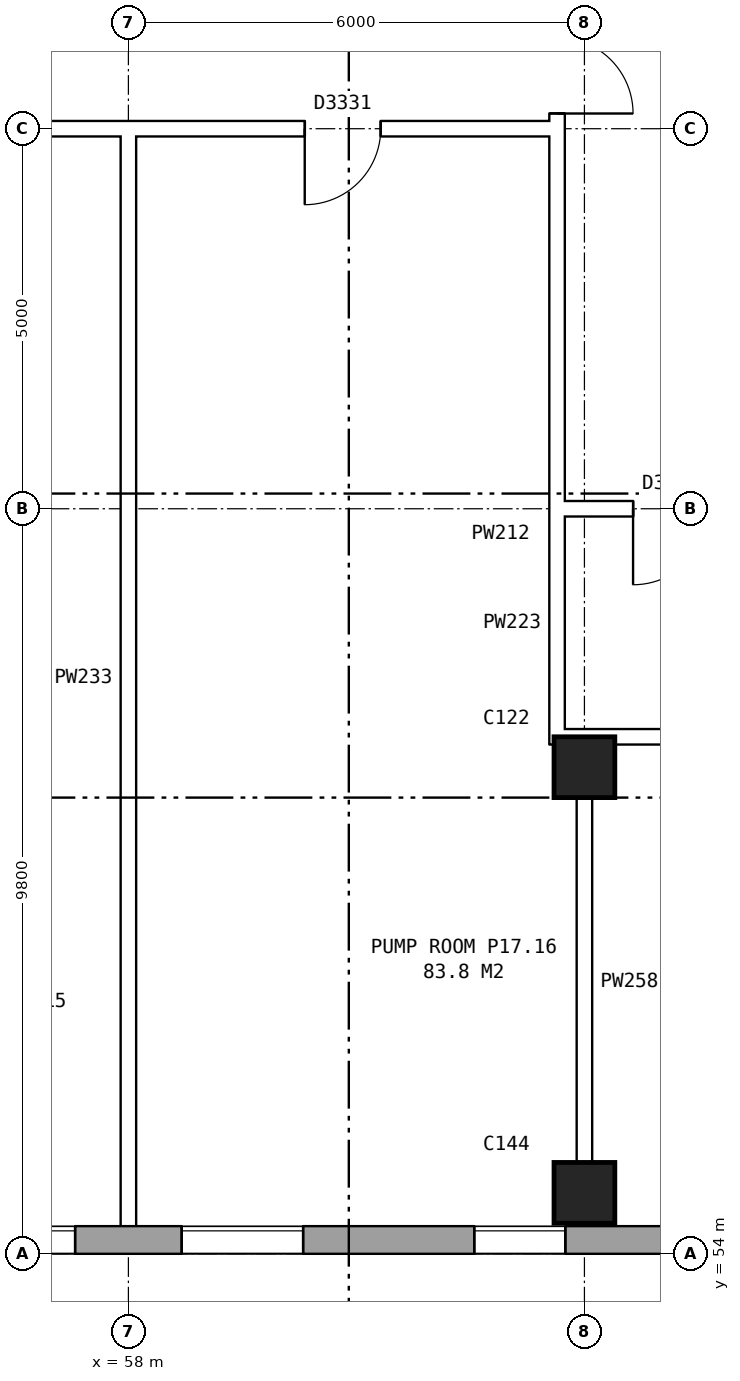
"""IFC4 building model, lengths in metres.
Left out: names, types, materials, properties, quantities, classifications, styles, units other than length and angle.
Written with IfcOpenShell. Run it as: python <this file> out.ifc"""

import sys

from ifc_helpers import new_model, si_unit, direction, frame, frame_2d, origin, origin_2d, place, context, subcontext, project, spatial, rectangle, extrude, element, fill, save


model = new_model("IFC4")
c1 = context("Model", 3, precision=1e-05, world=origin(), true_north=direction((0.0, 1.0)))
c2 = subcontext(c1, "Body", "Model", "MODEL_VIEW")
j1 = project(units=[si_unit("LENGTHUNIT", "METRE"), si_unit("PLANEANGLEUNIT", "RADIAN")], contexts=[c1])
p1 = place(None, origin())
s1 = spatial("IfcSite", under=j1, at=p1, CompositionType="ELEMENT")
p2 = place(p1, origin())
s2 = spatial("IfcBuilding", under=s1, at=p2, CompositionType="ELEMENT")
p3 = place(p2, frame((0.0, 0.0, 62.9)))
s3 = spatial("IfcBuildingStorey", under=s2, at=p3, CompositionType="ELEMENT", Elevation=62.9)
for number, where, z_axis, x_axis in (
    (1, (64.0, 54.8, 0.0), (0.0, 0.0, 1.0), (1.0, 0.0, 0.0)),
    (2, (64.0, 60.4, 0.0), (0.0, 0.0, 1.0), (1.0, 0.0, 0.0)),
):
    element("IfcColumn", number, at=place(p3, frame(where, z_axis=z_axis, x_axis=x_axis)), inside=s3, PredefinedType="COLUMN", context=c2, shape_type="SweptSolid", body=[
        extrude(rectangle(XDim=0.8, YDim=0.8, at=origin_2d()), origin(), (0.0, 0.0, 1.0), 4.2),
    ])
p4 = place(p3, frame((26.325, 54.18, 0.0), z_axis=(0.0, 0.0, 1.0), x_axis=(1.0, 0.0, 0.0)))
e3 = element("IfcWall", 3, at=p4, inside=s3, PredefinedType="STANDARD", context=c2, shape_type="SweptSolid", body=[
    extrude(rectangle(XDim=46.601, YDim=0.36, at=frame_2d((23.3, 0.0))), origin(), (0.0, 0.0, 1.0), 4.2),
])
p5 = place(p4, frame((0.6, 0.0, 1.5)))
e4 = element("IfcOpeningElement", 4, at=p5, cuts=e3, PredefinedType="OPENING", context=c2, shape_type="SweptSolid", body=[
    extrude(rectangle(XDim=0.6, YDim=1.2, at=frame_2d((0.3, 0.6))), frame((0.0, 0.19, 0.0), z_axis=(0.0, -1.0, 0.0), x_axis=(1.0, 0.0, 0.0)), (0.0, 0.0, 1.0), 0.38),
])
p6 = place(p4, frame((5.375, 0.0, 1.5)))
e5 = element("IfcOpeningElement", 5, at=p6, cuts=e3, PredefinedType="OPENING", context=c2, shape_type="SweptSolid", body=[
    extrude(rectangle(XDim=1.6, YDim=1.2, at=frame_2d((0.8, 0.6))), frame((0.0, 0.19, 0.0), z_axis=(0.0, -1.0, 0.0), x_axis=(1.0, 0.0, 0.0)), (0.0, 0.0, 1.0), 0.38),
])
p7 = place(p4, frame((8.375, 0.0, 1.5)))
e6 = element("IfcOpeningElement", 6, at=p7, cuts=e3, PredefinedType="OPENING", context=c2, shape_type="SweptSolid", body=[
    extrude(rectangle(XDim=1.6, YDim=1.2, at=frame_2d((0.8, 0.6))), frame((0.0, 0.19, 0.0), z_axis=(0.0, -1.0, 0.0), x_axis=(1.0, 0.0, 0.0)), (0.0, 0.0, 1.0), 0.38),
])
p8 = place(p4, frame((12.475, 0.0, 1.5)))
e7 = element("IfcOpeningElement", 7, at=p8, cuts=e3, PredefinedType="OPENING", context=c2, shape_type="SweptSolid", body=[
    extrude(rectangle(XDim=0.6, YDim=1.2, at=frame_2d((0.3, 0.6))), frame((0.0, 0.19, 0.0), z_axis=(0.0, -1.0, 0.0), x_axis=(1.0, 0.0, 0.0)), (0.0, 0.0, 1.0), 0.38),
])
p9 = place(p4, frame((13.375, 0.0, 1.5)))
e8 = element("IfcOpeningElement", 8, at=p9, cuts=e3, PredefinedType="OPENING", context=c2, shape_type="SweptSolid", body=[
    extrude(rectangle(XDim=1.2, YDim=1.2, at=frame_2d((0.6, 0.6))), frame((0.0, 0.19, 0.0), z_axis=(0.0, -1.0, 0.0), x_axis=(1.0, 0.0, 0.0)), (0.0, 0.0, 1.0), 0.38),
])
p10 = place(p4, frame((17.375, 0.0, 1.5)))
e9 = element("IfcOpeningElement", 9, at=p10, cuts=e3, PredefinedType="OPENING", context=c2, shape_type="SweptSolid", body=[
    extrude(rectangle(XDim=1.6, YDim=1.2, at=frame_2d((0.8, 0.6))), frame((0.0, 0.19, 0.0), z_axis=(0.0, -1.0, 0.0), x_axis=(1.0, 0.0, 0.0)), (0.0, 0.0, 1.0), 0.38),
])
p11 = place(p4, frame((20.375, 0.0, 1.5)))
e10 = element("IfcOpeningElement", 10, at=p11, cuts=e3, PredefinedType="OPENING", context=c2, shape_type="SweptSolid", body=[
    extrude(rectangle(XDim=1.6, YDim=1.2, at=frame_2d((0.8, 0.6))), frame((0.0, 0.19, 0.0), z_axis=(0.0, -1.0, 0.0), x_axis=(1.0, 0.0, 0.0)), (0.0, 0.0, 1.0), 0.38),
])
p12 = place(p4, frame((19.275, 0.0, 1.5)))
e11 = element("IfcOpeningElement", 11, at=p12, cuts=e3, PredefinedType="OPENING", context=c2, shape_type="SweptSolid", body=[
    extrude(rectangle(XDim=0.6, YDim=1.2, at=frame_2d((0.3, 0.6))), frame((0.0, 0.19, 0.0), z_axis=(0.0, -1.0, 0.0), x_axis=(1.0, 0.0, 0.0)), (0.0, 0.0, 1.0), 0.38),
])
p13 = place(p4, frame((29.375, 0.0, 1.5)))
e12 = element("IfcOpeningElement", 12, at=p13, cuts=e3, PredefinedType="OPENING", context=c2, shape_type="SweptSolid", body=[
    extrude(rectangle(XDim=1.6, YDim=1.2, at=frame_2d((0.8, 0.6))), frame((0.0, 0.19, 0.0), z_axis=(0.0, -1.0, 0.0), x_axis=(1.0, 0.0, 0.0)), (0.0, 0.0, 1.0), 0.38),
])
p14 = place(p4, frame((32.375, 0.0, 1.5)))
e13 = element("IfcOpeningElement", 13, at=p14, cuts=e3, PredefinedType="OPENING", context=c2, shape_type="SweptSolid", body=[
    extrude(rectangle(XDim=1.6, YDim=1.2, at=frame_2d((0.8, 0.6))), frame((0.0, 0.19, 0.0), z_axis=(0.0, -1.0, 0.0), x_axis=(1.0, 0.0, 0.0)), (0.0, 0.0, 1.0), 0.38),
])
p15 = place(p4, frame((36.225, 0.0, 1.5)))
e14 = element("IfcOpeningElement", 14, at=p15, cuts=e3, PredefinedType="OPENING", context=c2, shape_type="SweptSolid", body=[
    extrude(rectangle(XDim=1.2, YDim=1.2, at=frame_2d((0.6, 0.6))), frame((0.0, 0.19, 0.0), z_axis=(0.0, -1.0, 0.0), x_axis=(1.0, 0.0, 0.0)), (0.0, 0.0, 1.0), 0.38),
])
p16 = place(p4, frame((43.275, 0.0, 1.5)))
e15 = element("IfcOpeningElement", 15, at=p16, cuts=e3, PredefinedType="OPENING", context=c2, shape_type="SweptSolid", body=[
    extrude(rectangle(XDim=0.6, YDim=1.2, at=frame_2d((0.3, 0.6))), frame((0.0, 0.19, 0.0), z_axis=(0.0, -1.0, 0.0), x_axis=(1.0, 0.0, 0.0)), (0.0, 0.0, 1.0), 0.38),
])
p17 = place(p4, frame((41.375, 0.0, 1.5)))
e16 = element("IfcOpeningElement", 16, at=p17, cuts=e3, PredefinedType="OPENING", context=c2, shape_type="SweptSolid", body=[
    extrude(rectangle(XDim=1.6, YDim=1.2, at=frame_2d((0.8, 0.6))), frame((0.0, 0.19, 0.0), z_axis=(0.0, -1.0, 0.0), x_axis=(1.0, 0.0, 0.0)), (0.0, 0.0, 1.0), 0.38),
])
p18 = place(p4, frame((44.175, 0.0, 1.5)))
e17 = element("IfcOpeningElement", 17, at=p18, cuts=e3, PredefinedType="OPENING", context=c2, shape_type="SweptSolid", body=[
    extrude(rectangle(XDim=1.2, YDim=1.2, at=frame_2d((0.6, 0.6))), frame((0.0, 0.19, 0.0), z_axis=(0.0, -1.0, 0.0), x_axis=(1.0, 0.0, 0.0)), (0.0, 0.0, 1.0), 0.38),
])
p19 = place(p4, frame((1.5, 0.0, 1.5)))
e18 = element("IfcOpeningElement", 18, at=p19, cuts=e3, PredefinedType="OPENING", context=c2, shape_type="SweptSolid", body=[
    extrude(rectangle(XDim=1.2, YDim=1.2, at=frame_2d((0.6, 0.6))), frame((0.0, 0.19, 0.0), z_axis=(0.0, -1.0, 0.0), x_axis=(1.0, 0.0, 0.0)), (0.0, 0.0, 1.0), 0.38),
])
p20 = place(p4, frame((24.375, 0.0, 1.5)))
e19 = element("IfcOpeningElement", 19, at=p20, cuts=e3, PredefinedType="OPENING", context=c2, shape_type="SweptSolid", body=[
    extrude(rectangle(XDim=0.9, YDim=1.2, at=frame_2d((0.45, 0.6))), frame((0.0, 0.19, 0.0), z_axis=(0.0, -1.0, 0.0), x_axis=(1.0, 0.0, 0.0)), (0.0, 0.0, 1.0), 0.38),
])
p21 = place(p3, frame((63.64, 63.9, 0.0), z_axis=(0.0, 0.0, 1.0), x_axis=(0.0, 1.0, 0.0)))
e20 = element("IfcWall", 20, at=p21, inside=s3, PredefinedType="PARTITIONING", context=c2, shape_type="SweptSolid", body=[
    extrude(rectangle(XDim=12.2, YDim=0.2, at=frame_2d((6.1, 0.0))), origin(), (0.0, 0.0, 1.0), 4.2),
])
p22 = place(p21, frame((5.1, 0.0, 0.0)))
e21 = element("IfcOpeningElement", 21, at=p22, cuts=e20, PredefinedType="OPENING", context=c2, shape_type="SweptSolid", body=[
    extrude(rectangle(XDim=2.0, YDim=2.1, at=frame_2d((1.0, 1.05))), frame((0.0, 0.11, 0.0), z_axis=(0.0, -1.0, 0.0), x_axis=(1.0, 0.0, 0.0)), (0.0, 0.0, 1.0), 0.22),
])
p23 = place(p3, frame((63.54, 60.8, 0.0), z_axis=(0.0, 0.0, 1.0), x_axis=(1.0, 0.0, 0.0)))
e22 = element("IfcWall", 22, at=p23, inside=s3, PredefinedType="PARTITIONING", context=c2, shape_type="SweptSolid", body=[
    extrude(rectangle(XDim=12.22, YDim=0.2, at=frame_2d((6.11, 0.0))), origin(), (0.0, 0.0, 1.0), 4.2),
])
p24 = place(p23, frame((5.78, 0.0, 0.0)))
e23 = element("IfcOpeningElement", 23, at=p24, cuts=e22, PredefinedType="OPENING", context=c2, shape_type="SweptSolid", body=[
    extrude(rectangle(XDim=1.0, YDim=2.1, at=frame_2d((0.5, 1.05))), frame((0.0, 0.11, 0.0), z_axis=(0.0, -1.0, 0.0), x_axis=(1.0, 0.0, 0.0)), (0.0, 0.0, 1.0), 0.22),
])
p25 = place(p3, frame((63.54, 63.8, 0.0), z_axis=(0.0, 0.0, 1.0), x_axis=(1.0, 0.0, 0.0)))
e24 = element("IfcWall", 24, at=p25, inside=s3, PredefinedType="PARTITIONING", context=c2, shape_type="SweptSolid", body=[
    extrude(rectangle(XDim=3.1, YDim=0.2, at=frame_2d((1.55, 0.0))), origin(), (0.0, 0.0, 1.0), 4.2),
])
p26 = place(p25, frame((1.1, 0.0, 0.0)))
e25 = element("IfcOpeningElement", 25, at=p26, cuts=e24, PredefinedType="OPENING", context=c2, shape_type="SweptSolid", body=[
    extrude(rectangle(XDim=1.0, YDim=2.1, at=frame_2d((0.5, 1.05))), frame((0.0, 0.11, 0.0), z_axis=(0.0, -1.0, 0.0), x_axis=(1.0, 0.0, 0.0)), (0.0, 0.0, 1.0), 0.22),
])
p27 = place(p3, frame((44.36, 68.8, 0.0), z_axis=(0.0, 0.0, 1.0), x_axis=(1.0, 0.0, 0.0)))
e26 = element("IfcWall", 26, at=p27, inside=s3, PredefinedType="PARTITIONING", context=c2, shape_type="SweptSolid", body=[
    extrude(rectangle(XDim=19.28, YDim=0.2, at=frame_2d((9.64, 0.0))), origin(), (0.0, 0.0, 1.0), 4.2),
])
p28 = place(p27, frame((10.14, 0.0, 0.0)))
e27 = element("IfcOpeningElement", 27, at=p28, cuts=e26, PredefinedType="OPENING", context=c2, shape_type="SweptSolid", body=[
    extrude(rectangle(XDim=1.0, YDim=2.1, at=frame_2d((0.5, 1.05))), frame((0.0, 0.11, 0.0), z_axis=(0.0, -1.0, 0.0), x_axis=(1.0, 0.0, 0.0)), (0.0, 0.0, 1.0), 0.22),
])
p29 = place(p27, frame((15.96, 0.0, 0.0)))
e28 = element("IfcOpeningElement", 28, at=p29, cuts=e26, PredefinedType="OPENING", context=c2, shape_type="SweptSolid", body=[
    extrude(rectangle(XDim=1.0, YDim=2.1, at=frame_2d((0.5, 1.05))), frame((0.0, 0.11, 0.0), z_axis=(0.0, -1.0, 0.0), x_axis=(1.0, 0.0, 0.0)), (0.0, 0.0, 1.0), 0.22),
])
p30 = place(p3, frame((58.0, 54.24, 0.0), z_axis=(0.0, 0.0, 1.0), x_axis=(0.0, 1.0, 0.0)))
e29 = element("IfcWall", 29, at=p30, inside=s3, PredefinedType="PARTITIONING", context=c2, shape_type="SweptSolid", body=[
    extrude(rectangle(XDim=14.66, YDim=0.2, at=frame_2d((7.33, 0.0))), origin(), (0.0, 0.0, 1.0), 4.2),
])
p31 = place(p3, frame((63.64, 60.7, 0.0), z_axis=(0.0, 0.0, 1.0), x_axis=(0.0, 1.0, 0.0)))
e30 = element("IfcWall", 30, at=p31, inside=s3, PredefinedType="PARTITIONING", context=c2, shape_type="SweptSolid", body=[
    extrude(rectangle(XDim=3.2, YDim=0.2, at=frame_2d((1.6, 0.0))), origin(), (0.0, 0.0, 1.0), 4.2),
])
p32 = place(p3, frame((64.0, 54.24, 0.0), z_axis=(0.0, 0.0, 1.0), x_axis=(0.0, 1.0, 0.0)))
e31 = element("IfcWall", 31, at=p32, inside=s3, PredefinedType="PARTITIONING", context=c2, shape_type="SweptSolid", body=[
    extrude(rectangle(XDim=6.66, YDim=0.2, at=frame_2d((3.33, 0.0))), origin(), (0.0, 0.0, 1.0), 4.2),
])
p33 = place(p13, origin())
e32 = element("IfcWindow", 32, at=p33, inside=s3, PartitioningType="DOUBLE_PANEL_HORIZONTAL", PredefinedType="WINDOW", context=c2, shape_type="SweptSolid", body=[
    extrude(rectangle(XDim=1.6, YDim=1.2, at=frame_2d((0.8, 0.6))), frame((0.0, 0.15, 0.0), z_axis=(0.0, -1.0, 0.0), x_axis=(1.0, 0.0, 0.0)), (0.0, 0.0, 1.0), 0.06),
])
fill(e12, e32)
p34 = place(p14, origin())
e33 = element("IfcWindow", 33, at=p34, inside=s3, PartitioningType="DOUBLE_PANEL_HORIZONTAL", PredefinedType="WINDOW", context=c2, shape_type="SweptSolid", body=[
    extrude(rectangle(XDim=1.6, YDim=1.2, at=frame_2d((0.8, 0.6))), frame((0.0, 0.15, 0.0), z_axis=(0.0, -1.0, 0.0), x_axis=(1.0, 0.0, 0.0)), (0.0, 0.0, 1.0), 0.06),
])
fill(e13, e33)
p35 = place(p15, origin())
e34 = element("IfcWindow", 34, at=p35, inside=s3, PartitioningType="DOUBLE_PANEL_HORIZONTAL", PredefinedType="WINDOW", context=c2, shape_type="SweptSolid", body=[
    extrude(rectangle(XDim=1.2, YDim=1.2, at=frame_2d((0.6, 0.6))), frame((0.0, 0.15, 0.0), z_axis=(0.0, -1.0, 0.0), x_axis=(1.0, 0.0, 0.0)), (0.0, 0.0, 1.0), 0.06),
])
fill(e14, e34)
p36 = place(p22, frame((2.0, 0.0, 0.0), z_axis=(0.0, 0.0, 1.0), x_axis=(-1.0, 0.0, 0.0)))
e35 = element("IfcDoor", 35, at=p36, inside=s3, OperationType="DOUBLE_DOOR_SINGLE_SWING", PredefinedType="DOOR", context=c2, shape_type="SweptSolid", body=[
    extrude(rectangle(XDim=2.0, YDim=2.1, at=frame_2d((1.0, 1.05))), frame((0.0, 0.025, 0.0), z_axis=(0.0, -1.0, 0.0), x_axis=(1.0, 0.0, 0.0)), (0.0, 0.0, 1.0), 0.05),
])
fill(e21, e35)
p37 = place(p26, frame((1.0, 0.0, 0.0), z_axis=(0.0, 0.0, 1.0), x_axis=(-1.0, 0.0, 0.0)))
e36 = element("IfcDoor", 36, at=p37, inside=s3, OperationType="SINGLE_SWING_RIGHT", PredefinedType="DOOR", context=c2, shape_type="SweptSolid", body=[
    extrude(rectangle(XDim=1.0, YDim=2.1, at=frame_2d((0.5, 1.05))), frame((0.0, 0.025, 0.0), z_axis=(0.0, -1.0, 0.0), x_axis=(1.0, 0.0, 0.0)), (0.0, 0.0, 1.0), 0.05),
])
fill(e25, e36)
p38 = place(p29, frame((1.0, 0.0, 0.0), z_axis=(0.0, 0.0, 1.0), x_axis=(-1.0, 0.0, 0.0)))
e37 = element("IfcDoor", 37, at=p38, inside=s3, OperationType="SINGLE_SWING_RIGHT", PredefinedType="DOOR", context=c2, shape_type="SweptSolid", body=[
    extrude(rectangle(XDim=1.0, YDim=2.1, at=frame_2d((0.5, 1.05))), frame((0.0, 0.025, 0.0), z_axis=(0.0, -1.0, 0.0), x_axis=(1.0, 0.0, 0.0)), (0.0, 0.0, 1.0), 0.05),
])
fill(e28, e37)
save(model, sys.argv[1])
